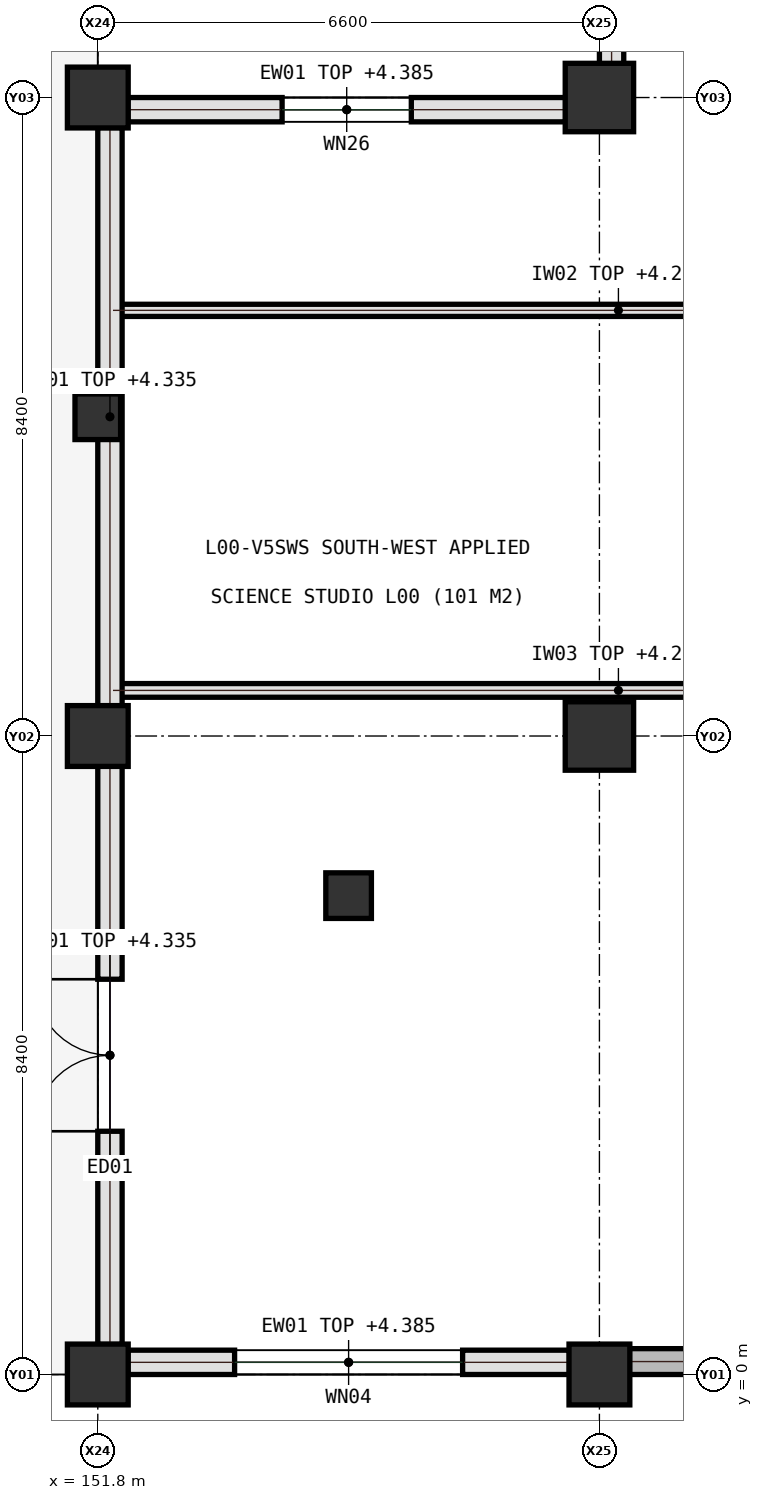
"""IFC4 building model, lengths in metres.
Left out: names, types, materials, properties, quantities, classifications, styles, units other than length and angle.
Written with IfcOpenShell. Run it as: python <this file> out.ifc"""

import sys

from ifc_helpers import new_model, si_unit, direction, frame, frame_2d, origin, origin_2d, place, context, subcontext, project, spatial, rectangle, extrude, element, fill, save


model = new_model("IFC4")
c1 = context("Model", 3, precision=1e-05, world=origin(), true_north=direction((0.0, 1.0)))
c2 = subcontext(c1, "Body", "Model", "MODEL_VIEW")
j1 = project(units=[si_unit("LENGTHUNIT", "METRE"), si_unit("PLANEANGLEUNIT", "RADIAN")], contexts=[c1])
p1 = place(None, origin())
s1 = spatial("IfcSite", under=j1, at=p1, CompositionType="ELEMENT")
p2 = place(p1, origin())
s2 = spatial("IfcBuilding", under=s1, at=p2, CompositionType="ELEMENT")
p3 = place(p2, origin())
s3 = spatial("IfcBuildingStorey", under=s2, at=p3, CompositionType="ELEMENT", Elevation=0.0)
for number, where, z_axis, x_axis in (
    (1, (151.8, 0.0, 0.0), (0.0, 0.0, 1.0), (1.0, 0.0, 0.0)),
    (2, (151.8, 8.4, 0.0), (0.0, 0.0, 1.0), (1.0, 0.0, 0.0)),
    (3, (151.8, 16.8, 0.0), (0.0, 0.0, 1.0), (1.0, 0.0, 0.0)),
    (4, (158.4, 0.0, 0.0), (0.0, 0.0, 1.0), (1.0, 0.0, 0.0)),
):
    element("IfcColumn", number, at=place(p3, frame(where, z_axis=z_axis, x_axis=x_axis)), inside=s3, PredefinedType="COLUMN", context=c2, shape_type="SweptSolid", body=[
        extrude(rectangle(XDim=0.8, YDim=0.8, at=origin_2d()), origin(), (0.0, 0.0, 1.0), 5.4),
    ])
for number, where, z_axis, x_axis in (
    (5, (158.4, 8.4, 0.0), (0.0, 0.0, 1.0), (1.0, 0.0, 0.0)),
    (6, (158.4, 16.8, 0.0), (0.0, 0.0, 1.0), (1.0, 0.0, 0.0)),
):
    element("IfcColumn", number, at=place(p3, frame(where, z_axis=z_axis, x_axis=x_axis)), inside=s3, PredefinedType="COLUMN", context=c2, shape_type="SweptSolid", body=[
        extrude(rectangle(XDim=0.9, YDim=0.9, at=origin_2d()), origin(), (0.0, 0.0, 1.0), 5.4),
    ])
for number, where, z_axis, x_axis in (
    (7, (151.8, 12.6, 0.0), (0.0, 0.0, 1.0), (1.0, 0.0, 0.0)),
    (8, (155.1, 6.3, 0.0), (0.0, 0.0, 1.0), (1.0, 0.0, 0.0)),
):
    element("IfcColumn", number, at=place(p3, frame(where, z_axis=z_axis, x_axis=x_axis)), inside=s3, PredefinedType="COLUMN", context=c2, shape_type="SweptSolid", body=[
        extrude(rectangle(XDim=0.6, YDim=0.6, at=origin_2d()), origin(), (0.0, 0.0, 1.0), 5.4),
    ])
p4 = place(p3, frame((152.0, 9.0, 0.0), z_axis=(0.0, 0.0, 1.0), x_axis=(1.0, 0.0, 0.0)))
e9 = element("IfcWall", 9, at=p4, inside=s3, PredefinedType="SOLIDWALL", context=c2, shape_type="SweptSolid", body=[
    extrude(rectangle(XDim=13.3, YDim=0.18, at=frame_2d((6.65, 0.0))), origin(), (0.0, 0.0, 1.0), 4.25),
])
p5 = place(p4, frame((8.8, 0.0, 0.0)))
e10 = element("IfcOpeningElement", 10, at=p5, cuts=e9, PredefinedType="OPENING", context=c2, shape_type="SweptSolid", body=[
    extrude(rectangle(XDim=1.1, YDim=2.15, at=frame_2d((0.55, 1.075))), frame((0.0, 0.1, 0.0), z_axis=(0.0, -1.0, 0.0), x_axis=(1.0, 0.0, 0.0)), (0.0, 0.0, 1.0), 0.2),
])
p6 = place(p3, frame((152.0, 14.0, 0.0), z_axis=(0.0, 0.0, 1.0), x_axis=(1.0, 0.0, 0.0)))
e11 = element("IfcWall", 11, at=p6, inside=s3, PredefinedType="PARTITIONING", context=c2, shape_type="SweptSolid", body=[
    extrude(rectangle(XDim=13.3, YDim=0.16, at=frame_2d((6.65, 0.0))), origin(), (0.0, 0.0, 1.0), 4.25),
])
p7 = place(p6, frame((9.8, 0.0, 0.0)))
e12 = element("IfcOpeningElement", 12, at=p7, cuts=e11, PredefinedType="OPENING", context=c2, shape_type="SweptSolid", body=[
    extrude(rectangle(XDim=0.98, YDim=2.12, at=frame_2d((0.49, 1.06))), frame((0.0, 0.09, 0.0), z_axis=(0.0, -1.0, 0.0), x_axis=(1.0, 0.0, 0.0)), (0.0, 0.0, 1.0), 0.18),
])
p8 = place(p3, frame((152.195, 0.16, 0.0), z_axis=(0.0, 0.0, 1.0), x_axis=(1.0, 0.0, 0.0)))
e13 = element("IfcWall", 13, at=p8, inside=s3, PredefinedType="SOLIDWALL", context=c2, shape_type="SweptSolid", body=[
    extrude(rectangle(XDim=5.81, YDim=0.32, at=frame_2d((2.905, 0.0))), origin(), (0.0, 0.0, 1.0), 4.385),
])
p9 = place(p8, frame((1.405, 0.0, 0.95)))
e14 = element("IfcOpeningElement", 14, at=p9, cuts=e13, PredefinedType="OPENING", context=c2, shape_type="SweptSolid", body=[
    extrude(rectangle(XDim=3.0, YDim=1.8, at=frame_2d((1.5, 0.9))), frame((0.0, 0.17, 0.0), z_axis=(0.0, -1.0, 0.0), x_axis=(1.0, 0.0, 0.0)), (0.0, 0.0, 1.0), 0.34),
])
p10 = place(p3, frame((151.96, 8.005, 0.0), z_axis=(0.0, 0.0, 1.0), x_axis=(0.0, -1.0, 0.0)))
e15 = element("IfcWall", 15, at=p10, inside=s3, PredefinedType="SOLIDWALL", context=c2, shape_type="SweptSolid", body=[
    extrude(rectangle(XDim=7.61, YDim=0.32, at=frame_2d((3.805, 0.0))), origin(), (0.0, 0.0, 1.0), 4.335),
])
p11 = place(p10, frame((2.805, 0.0, 0.0)))
e16 = element("IfcOpeningElement", 16, at=p11, cuts=e15, PredefinedType="OPENING", context=c2, shape_type="SweptSolid", body=[
    extrude(rectangle(XDim=2.0, YDim=2.4, at=frame_2d((1.0, 1.2))), frame((0.0, 0.17, 0.0), z_axis=(0.0, -1.0, 0.0), x_axis=(1.0, 0.0, 0.0)), (0.0, 0.0, 1.0), 0.34),
])
p12 = place(p3, frame((157.955, 16.64, 0.0), z_axis=(0.0, 0.0, 1.0), x_axis=(-1.0, 0.0, 0.0)))
e17 = element("IfcWall", 17, at=p12, inside=s3, PredefinedType="SOLIDWALL", context=c2, shape_type="SweptSolid", body=[
    extrude(rectangle(XDim=5.76, YDim=0.32, at=frame_2d((2.88, 0.0))), origin(), (0.0, 0.0, 1.0), 4.385),
])
p13 = place(p12, frame((2.03, 0.0, 0.95)))
e18 = element("IfcOpeningElement", 18, at=p13, cuts=e17, PredefinedType="OPENING", context=c2, shape_type="SweptSolid", body=[
    extrude(rectangle(XDim=1.7, YDim=1.95, at=frame_2d((0.85, 0.975))), frame((0.0, 0.17, 0.0), z_axis=(0.0, -1.0, 0.0), x_axis=(1.0, 0.0, 0.0)), (0.0, 0.0, 1.0), 0.34),
])
p14 = place(p3, frame((151.96, 16.405, 0.0), z_axis=(0.0, 0.0, 1.0), x_axis=(0.0, -1.0, 0.0)))
e19 = element("IfcWall", 19, at=p14, inside=s3, PredefinedType="SOLIDWALL", context=c2, shape_type="SweptSolid", body=[
    extrude(rectangle(XDim=7.61, YDim=0.32, at=frame_2d((3.805, 0.0))), origin(), (0.0, 0.0, 1.0), 4.335),
])
p15 = place(p3, frame((158.795, 0.17, 0.0), z_axis=(0.0, 0.0, 1.0), x_axis=(1.0, 0.0, 0.0)))
e20 = element("IfcWall", 20, at=p15, inside=s3, PredefinedType="SHEAR", context=c2, shape_type="SweptSolid", body=[
    extrude(rectangle(XDim=5.81, YDim=0.34, at=frame_2d((2.905, 0.0))), origin(), (0.0, 0.0, 1.0), 5.1),
])
p16 = place(p3, frame((158.56, 24.755, 0.0), z_axis=(0.0, 0.0, 1.0), x_axis=(0.0, -1.0, 0.0)))
e21 = element("IfcWall", 21, at=p16, inside=s3, PredefinedType="SOLIDWALL", context=c2, shape_type="SweptSolid", body=[
    extrude(rectangle(XDim=7.51, YDim=0.32, at=frame_2d((3.755, 0.0))), origin(), (0.0, 0.0, 1.0), 4.335),
])
p17 = place(p16, frame((2.955, 0.0, 0.95)))
e22 = element("IfcOpeningElement", 22, at=p17, cuts=e21, PredefinedType="OPENING", context=c2, shape_type="SweptSolid", body=[
    extrude(rectangle(XDim=1.6, YDim=1.85, at=frame_2d((0.8, 0.925))), frame((0.0, 0.17, 0.0), z_axis=(0.0, -1.0, 0.0), x_axis=(1.0, 0.0, 0.0)), (0.0, 0.0, 1.0), 0.34),
])
p18 = place(p9, origin())
e23 = element("IfcWindow", 23, at=p18, inside=s3, PartitioningType="SINGLE_PANEL", PredefinedType="WINDOW", context=c2, shape_type="SweptSolid", body=[
    extrude(rectangle(XDim=3.0, YDim=1.8, at=frame_2d((1.5, 0.9))), frame((0.0, 0.03, 0.0), z_axis=(0.0, -1.0, 0.0), x_axis=(1.0, 0.0, 0.0)), (0.0, 0.0, 1.0), 0.06),
])
fill(e14, e23)
p19 = place(p11, frame((2.0, 0.0, 0.0), z_axis=(0.0, 0.0, 1.0), x_axis=(-1.0, 0.0, 0.0)))
e24 = element("IfcDoor", 24, at=p19, inside=s3, OperationType="DOUBLE_DOOR_SINGLE_SWING", PredefinedType="DOOR", context=c2, shape_type="SweptSolid", body=[
    extrude(rectangle(XDim=2.0, YDim=2.4, at=frame_2d((1.0, 1.2))), frame((0.0, 0.025, 0.0), z_axis=(0.0, -1.0, 0.0), x_axis=(1.0, 0.0, 0.0)), (0.0, 0.0, 1.0), 0.05),
])
fill(e16, e24)
p20 = place(p13, origin())
e25 = element("IfcWindow", 25, at=p20, inside=s3, PartitioningType="SINGLE_PANEL", PredefinedType="WINDOW", context=c2, shape_type="SweptSolid", body=[
    extrude(rectangle(XDim=1.7, YDim=1.95, at=frame_2d((0.85, 0.975))), frame((0.0, 0.03, 0.0), z_axis=(0.0, -1.0, 0.0), x_axis=(1.0, 0.0, 0.0)), (0.0, 0.0, 1.0), 0.06),
])
fill(e18, e25)
save(model, sys.argv[1])
